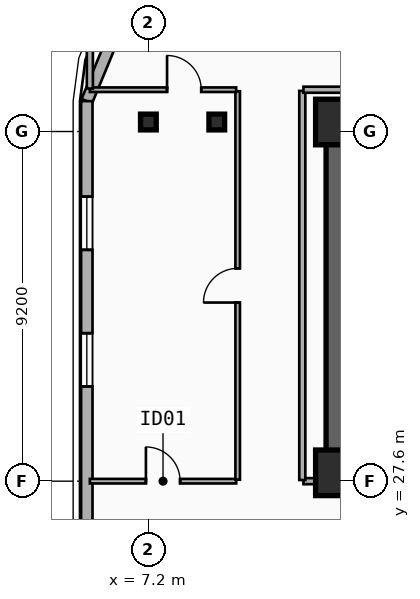
"""IFC4 building model, lengths in metres.
Left out: names, types, materials, properties, quantities, classifications, styles, units other than length and angle.
Written with IfcOpenShell. Run it as: python <this file> out.ifc"""

import sys

from ifc_helpers import new_model, si_unit, direction, frame, frame_2d, origin, origin_2d, place, context, subcontext, project, spatial, rectangle, i_section, extrude, element, fill, save


model = new_model("IFC4")
c1 = context("Model", 3, precision=1e-05, world=origin(), true_north=direction((0.0, 1.0)))
c2 = subcontext(c1, "Body", "Model", "MODEL_VIEW")
j1 = project(units=[si_unit("LENGTHUNIT", "METRE"), si_unit("PLANEANGLEUNIT", "RADIAN")], contexts=[c1])
p1 = place(None, origin())
s1 = spatial("IfcSite", under=j1, at=p1, CompositionType="ELEMENT")
p2 = place(p1, origin())
s2 = spatial("IfcBuilding", under=s1, at=p2, CompositionType="ELEMENT")
p3 = place(p2, frame((0.0, 0.0, 144.8)))
s3 = spatial("IfcBuildingStorey", under=s2, at=p3, CompositionType="ELEMENT", Elevation=144.8)
p4 = place(p3, frame((12.15, 37.05, 0.0), z_axis=(0.0, 0.0, 1.0), x_axis=(1.0, 0.0, 0.0)))
e1 = element("IfcWall", 1, at=p4, inside=s3, PredefinedType="SHEAR", context=c2, shape_type="SweptSolid", body=[
    extrude(rectangle(XDim=33.23, YDim=0.55, at=frame_2d((16.615, 0.0))), origin(), (0.0, 0.0, 1.0), 3.55),
])
p5 = place(p3, frame((21.18, 27.82, 0.0), z_axis=(0.0, 0.0, 1.0), x_axis=(-1.0, 0.0, 0.0)))
e2 = element("IfcWall", 2, at=p5, inside=s3, PredefinedType="SHEAR", context=c2, shape_type="SweptSolid", body=[
    extrude(rectangle(XDim=9.03, YDim=0.55, at=frame_2d((4.515, 0.0))), origin(), (0.0, 0.0, 1.0), 3.55),
])
p6 = place(p5, frame((2.68, 0.0, 0.0)))
e3 = element("IfcOpeningElement", 3, at=p6, cuts=e2, PredefinedType="OPENING", context=c2, shape_type="SweptSolid", body=[
    extrude(rectangle(XDim=1.1, YDim=2.15, at=frame_2d((0.55, 1.075))), frame((0.0, 0.285, 0.0), z_axis=(0.0, -1.0, 0.0), x_axis=(1.0, 0.0, 0.0)), (0.0, 0.0, 1.0), 0.57),
])
p7 = place(p3, frame((12.15, 28.095, 0.0), z_axis=(0.0, 0.0, 1.0), x_axis=(0.0, 1.0, 0.0)))
e4 = element("IfcWall", 4, at=p7, inside=s3, PredefinedType="SHEAR", context=c2, shape_type="SweptSolid", body=[
    extrude(rectangle(XDim=8.68, YDim=0.55, at=frame_2d((4.34, 0.0))), origin(), (0.0, 0.0, 1.0), 3.55),
])
for number, where, z_axis, x_axis in (
    (5, (12.2, 27.82, 0.0), (0.0, 0.0, 1.0), (1.0, 0.0, 0.0)),
    (6, (12.2, 37.05, 0.0), (0.0, 0.0, 1.0), (1.0, 0.0, 0.0)),
):
    element("IfcColumn", number, at=place(p3, frame(where, z_axis=z_axis, x_axis=x_axis)), inside=s3, PredefinedType="COLUMN", context=c2, shape_type="SweptSolid", body=[
        extrude(rectangle(XDim=1.2, YDim=1.2, at=origin_2d()), origin(), (0.0, 0.0, 1.0), 3.55),
    ])
for number, where, z_axis, x_axis in (
    (7, (9.0, 37.05, 0.0), (0.0, 0.0, 1.0), (1.0, 0.0, 0.0)),
    (8, (7.2, 37.05, 0.0), (0.0, 0.0, 1.0), (1.0, 0.0, 0.0)),
):
    element("IfcColumn", number, at=place(p3, frame(where, z_axis=z_axis, x_axis=x_axis)), inside=s3, PredefinedType="COLUMN", context=c2, shape_type="SweptSolid", body=[
        extrude(i_section(OverallWidth=0.413, OverallDepth=0.415, WebThickness=0.03, FlangeThickness=0.047, FilletRadius=0.015, at=origin_2d()), origin(), (0.0, 0.0, 1.0), 3.55),
    ])
p8 = place(p3, frame((5.58, 37.6, 0.0), z_axis=(0.0, 0.0, 1.0), x_axis=(0.382636798336, 0.92389884758, 0.0)))
e9 = element("IfcWall", 9, at=p8, inside=s3, PredefinedType="SOLIDWALL", context=c2, shape_type="SweptSolid", body=[
    extrude(rectangle(XDim=3.077, YDim=0.3, at=frame_2d((1.538, 0.0))), origin(), (0.0, 0.0, 1.0), 3.29),
])
p9 = place(p3, frame((5.58, 14.6, 0.0), z_axis=(0.0, 0.0, 1.0), x_axis=(0.0, 1.0, 0.0)))
e10 = element("IfcWall", 10, at=p9, inside=s3, PredefinedType="SOLIDWALL", context=c2, shape_type="SweptSolid", body=[
    extrude(rectangle(XDim=23.0, YDim=0.3, at=frame_2d((11.5, 0.0))), origin(), (0.0, 0.0, 1.0), 3.29),
])
p10 = place(p9, frame((15.493, 0.0, 0.34)))
e11 = element("IfcOpeningElement", 11, at=p10, cuts=e10, PredefinedType="OPENING", context=c2, shape_type="SweptSolid", body=[
    extrude(rectangle(XDim=1.4, YDim=2.1, at=frame_2d((0.7, 1.05))), frame((0.0, 0.16, 0.0), z_axis=(0.0, -1.0, 0.0), x_axis=(1.0, 0.0, 0.0)), (0.0, 0.0, 1.0), 0.32),
])
p11 = place(p9, frame((19.087, 0.0, 0.34)))
e12 = element("IfcOpeningElement", 12, at=p11, cuts=e10, PredefinedType="OPENING", context=c2, shape_type="SweptSolid", body=[
    extrude(rectangle(XDim=1.4, YDim=2.1, at=frame_2d((0.7, 1.05))), frame((0.0, 0.16, 0.0), z_axis=(0.0, -1.0, 0.0), x_axis=(1.0, 0.0, 0.0)), (0.0, 0.0, 1.0), 0.32),
])
p12 = place(p9, frame((2.83, 0.0, 0.34)))
e13 = element("IfcOpeningElement", 13, at=p12, cuts=e10, PredefinedType="OPENING", context=c2, shape_type="SweptSolid", body=[
    extrude(rectangle(XDim=1.4, YDim=2.1, at=frame_2d((0.7, 1.05))), frame((0.0, 0.16, 0.0), z_axis=(0.0, -1.0, 0.0), x_axis=(1.0, 0.0, 0.0)), (0.0, 0.0, 1.0), 0.32),
])
p13 = place(p9, frame((6.74, 0.0, 0.34)))
e14 = element("IfcOpeningElement", 14, at=p13, cuts=e10, PredefinedType="OPENING", context=c2, shape_type="SweptSolid", body=[
    extrude(rectangle(XDim=1.4, YDim=2.1, at=frame_2d((0.7, 1.05))), frame((0.0, 0.16, 0.0), z_axis=(0.0, -1.0, 0.0), x_axis=(1.0, 0.0, 0.0)), (0.0, 0.0, 1.0), 0.32),
])
p14 = place(p3, frame((5.66, 27.6, 0.0), z_axis=(0.0, 0.0, 1.0), x_axis=(1.0, 0.0, 0.0)))
e15 = element("IfcWall", 15, at=p14, inside=s3, PredefinedType="PARTITIONING", context=c2, shape_type="SweptSolid", body=[
    extrude(rectangle(XDim=3.85, YDim=0.12, at=frame_2d((1.925, 0.0))), origin(), (0.0, 0.0, 1.0), 2.62),
])
p15 = place(p14, frame((1.475, 0.0, 0.0)))
e16 = element("IfcOpeningElement", 16, at=p15, cuts=e15, PredefinedType="OPENING", context=c2, shape_type="SweptSolid", body=[
    extrude(rectangle(XDim=0.9, YDim=2.1, at=frame_2d((0.45, 1.05))), frame((0.0, 0.07, 0.0), z_axis=(0.0, -1.0, 0.0), x_axis=(1.0, 0.0, 0.0)), (0.0, 0.0, 1.0), 0.14),
])
p16 = place(p3, frame((9.55, 27.64, 0.0), z_axis=(0.0, 0.0, 1.0), x_axis=(0.0, 1.0, 0.0)))
e17 = element("IfcWall", 17, at=p16, inside=s3, PredefinedType="PARTITIONING", context=c2, shape_type="SweptSolid", body=[
    extrude(rectangle(XDim=10.22, YDim=0.12, at=frame_2d((5.11, 0.0))), origin(), (0.0, 0.0, 1.0), 2.77),
])
p17 = place(p16, frame((4.66, 0.0, 0.0)))
e18 = element("IfcOpeningElement", 18, at=p17, cuts=e17, PredefinedType="OPENING", context=c2, shape_type="SweptSolid", body=[
    extrude(rectangle(XDim=0.9, YDim=2.1, at=frame_2d((0.45, 1.05))), frame((0.0, 0.07, 0.0), z_axis=(0.0, -1.0, 0.0), x_axis=(1.0, 0.0, 0.0)), (0.0, 0.0, 1.0), 0.14),
])
p18 = place(p3, frame((5.66, 37.9, 0.0), z_axis=(0.0, 0.0, 1.0), x_axis=(1.0, 0.0, 0.0)))
e19 = element("IfcWall", 19, at=p18, inside=s3, PredefinedType="PARTITIONING", context=c2, shape_type="SweptSolid", body=[
    extrude(rectangle(XDim=3.85, YDim=0.12, at=frame_2d((1.925, 0.0))), origin(), (0.0, 0.0, 1.0), 3.29),
])
p19 = place(p18, frame((2.031, 0.0, 0.0)))
e20 = element("IfcOpeningElement", 20, at=p19, cuts=e19, PredefinedType="OPENING", context=c2, shape_type="SweptSolid", body=[
    extrude(rectangle(XDim=0.9, YDim=2.1, at=frame_2d((0.45, 1.05))), frame((0.0, 0.07, 0.0), z_axis=(0.0, -1.0, 0.0), x_axis=(1.0, 0.0, 0.0)), (0.0, 0.0, 1.0), 0.14),
])
p20 = place(p3, frame((11.28, 27.6, 0.0), z_axis=(0.0, 0.0, 1.0), x_axis=(1.0, 0.0, 0.0)))
e21 = element("IfcWall", 21, at=p20, inside=s3, PredefinedType="PARTITIONING", context=c2, shape_type="SweptSolid", body=[
    extrude(rectangle(XDim=0.84, YDim=0.16, at=frame_2d((0.42, 0.0))), origin(), (0.0, 0.0, 1.0), 2.36),
])
p21 = place(p3, frame((11.25, 27.63, 0.0), z_axis=(0.0, 0.0, 1.0), x_axis=(0.0, 1.0, 0.0)))
e22 = element("IfcWall", 22, at=p21, inside=s3, PredefinedType="PARTITIONING", context=c2, shape_type="SweptSolid", body=[
    extrude(rectangle(XDim=10.24, YDim=0.16, at=frame_2d((5.12, 0.0))), origin(), (0.0, 0.0, 1.0), 2.77),
])
p22 = place(p3, frame((11.28, 37.9, 0.0), z_axis=(0.0, 0.0, 1.0), x_axis=(1.0, 0.0, 0.0)))
e23 = element("IfcWall", 23, at=p22, inside=s3, PredefinedType="PARTITIONING", context=c2, shape_type="SweptSolid", body=[
    extrude(rectangle(XDim=35.04, YDim=0.16, at=frame_2d((17.52, 0.0))), origin(), (0.0, 0.0, 1.0), 3.29),
])
p23 = place(p3, frame((5.66, 37.93, 0.0), z_axis=(0.0, 0.0, 1.0), x_axis=(0.0, 1.0, 0.0)))
e24 = element("IfcWall", 24, at=p23, inside=s3, PredefinedType="PARTITIONING", context=c2, shape_type="SweptSolid", body=[
    extrude(rectangle(XDim=1.44, YDim=0.16, at=frame_2d((0.72, 0.0))), origin(), (0.0, 0.0, 1.0), 3.29),
])
p24 = place(p10, origin())
e25 = element("IfcWindow", 25, at=p24, inside=s3, PartitioningType="SINGLE_PANEL", PredefinedType="WINDOW", context=c2, shape_type="SweptSolid", body=[
    extrude(rectangle(XDim=1.4, YDim=2.1, at=frame_2d((0.7, 1.05))), frame((0.0, 0.03, 0.0), z_axis=(0.0, -1.0, 0.0), x_axis=(1.0, 0.0, 0.0)), (0.0, 0.0, 1.0), 0.06),
])
fill(e11, e25)
p25 = place(p11, origin())
e26 = element("IfcWindow", 26, at=p25, inside=s3, PartitioningType="SINGLE_PANEL", PredefinedType="WINDOW", context=c2, shape_type="SweptSolid", body=[
    extrude(rectangle(XDim=1.4, YDim=2.1, at=frame_2d((0.7, 1.05))), frame((0.0, 0.03, 0.0), z_axis=(0.0, -1.0, 0.0), x_axis=(1.0, 0.0, 0.0)), (0.0, 0.0, 1.0), 0.06),
])
fill(e12, e26)
p26 = place(p15, origin())
e27 = element("IfcDoor", 27, at=p26, inside=s3, OperationType="SINGLE_SWING_LEFT", PredefinedType="DOOR", context=c2, shape_type="SweptSolid", body=[
    extrude(rectangle(XDim=0.9, YDim=2.1, at=frame_2d((0.45, 1.05))), frame((0.0, 0.025, 0.0), z_axis=(0.0, -1.0, 0.0), x_axis=(1.0, 0.0, 0.0)), (0.0, 0.0, 1.0), 0.05),
])
fill(e16, e27)
p27 = place(p17, origin())
e28 = element("IfcDoor", 28, at=p27, inside=s3, OperationType="SINGLE_SWING_LEFT", PredefinedType="DOOR", context=c2, shape_type="SweptSolid", body=[
    extrude(rectangle(XDim=0.9, YDim=2.1, at=frame_2d((0.45, 1.05))), frame((0.0, 0.025, 0.0), z_axis=(0.0, -1.0, 0.0), x_axis=(1.0, 0.0, 0.0)), (0.0, 0.0, 1.0), 0.05),
])
fill(e18, e28)
p28 = place(p19, origin())
e29 = element("IfcDoor", 29, at=p28, inside=s3, OperationType="SINGLE_SWING_LEFT", PredefinedType="DOOR", context=c2, shape_type="SweptSolid", body=[
    extrude(rectangle(XDim=0.9, YDim=2.1, at=frame_2d((0.45, 1.05))), frame((0.0, 0.025, 0.0), z_axis=(0.0, -1.0, 0.0), x_axis=(1.0, 0.0, 0.0)), (0.0, 0.0, 1.0), 0.05),
])
fill(e20, e29)
save(model, sys.argv[1])
